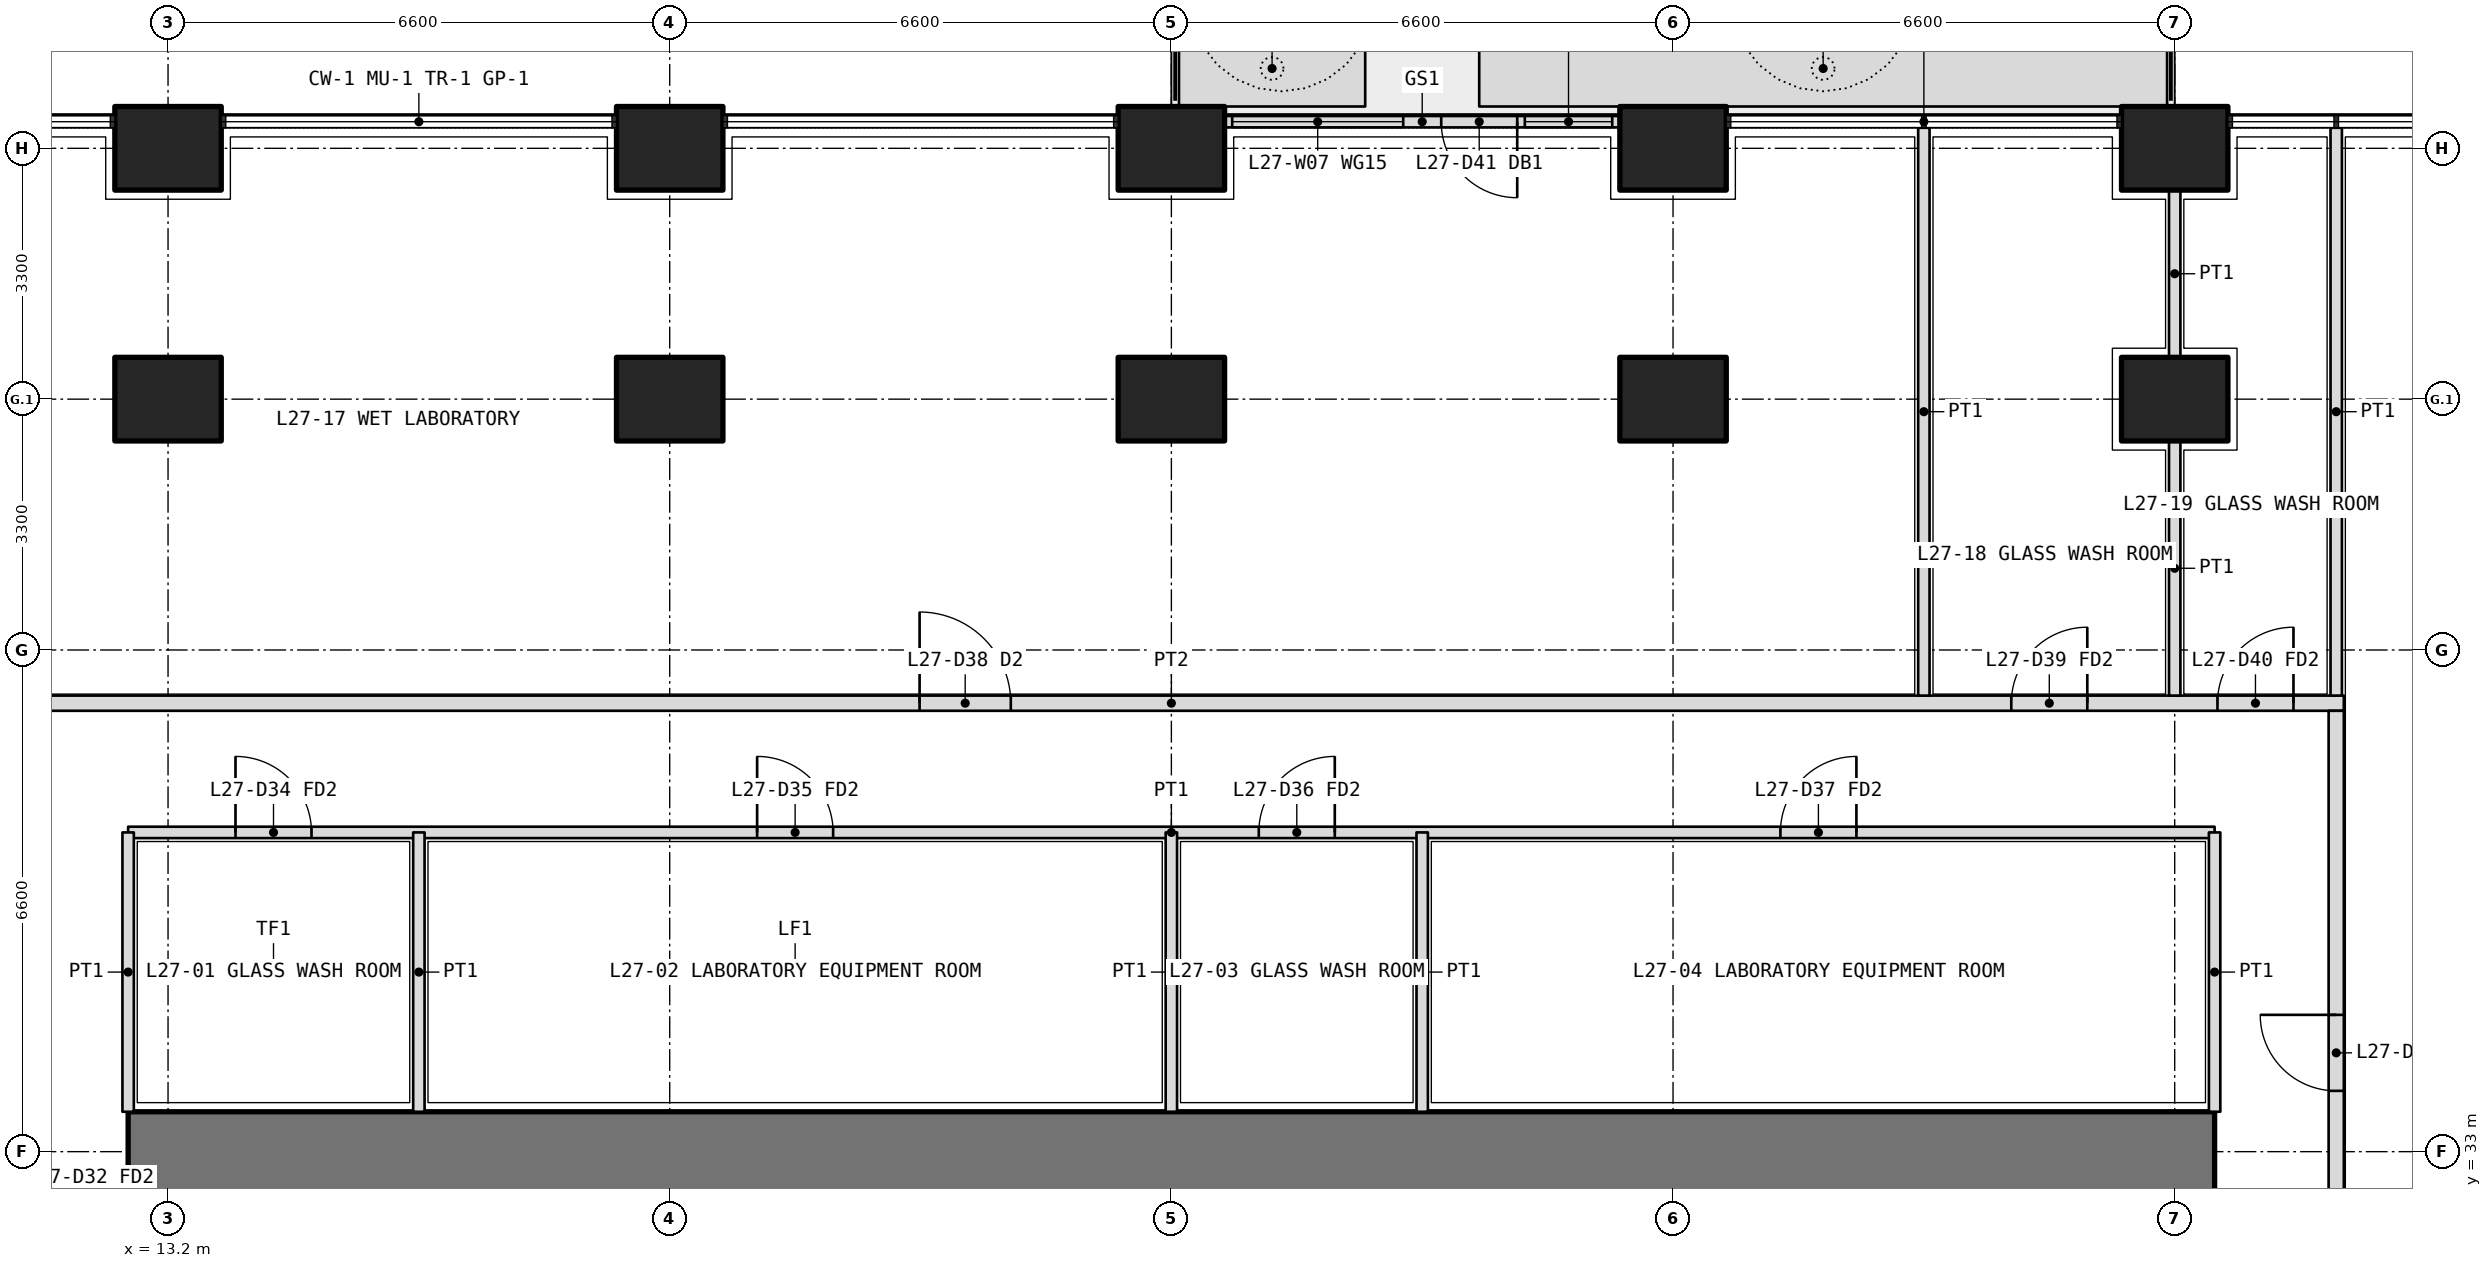
"""IFC4 building model, lengths in metres.
Left out: names, types, materials, properties, quantities, classifications, styles, units other than length and angle.
Written with IfcOpenShell. Run it as: python <this file> out.ifc"""

import sys

from ifc_helpers import new_model, si_unit, direction, frame, frame_2d, origin, origin_2d, place, context, subcontext, project, spatial, polyline, rectangle, outline, extrude, element, fill, save


model = new_model("IFC4")
c1 = context("Model", 3, precision=1e-05, world=origin(), true_north=direction((0.0, 1.0)))
c2 = subcontext(c1, "Body", "Model", "MODEL_VIEW")
j1 = project(units=[si_unit("LENGTHUNIT", "METRE"), si_unit("PLANEANGLEUNIT", "RADIAN")], contexts=[c1])
p1 = place(None, origin())
s1 = spatial("IfcSite", under=j1, at=p1, CompositionType="ELEMENT")
p2 = place(p1, origin())
s2 = spatial("IfcBuilding", under=s1, at=p2, CompositionType="ELEMENT")
p3 = place(p2, frame((0.0, 0.0, 120.0)))
s3 = spatial("IfcBuildingStorey", under=s2, at=p3, CompositionType="ELEMENT", Elevation=120.0)
for number, where, z_axis, x_axis in (
    (1, (13.2, 46.2, 0.0), (0.0, 0.0, 1.0), (1.0, 0.0, 0.0)),
    (2, (19.8, 46.2, 0.0), (0.0, 0.0, 1.0), (1.0, 0.0, 0.0)),
    (3, (26.4, 46.2, 0.0), (0.0, 0.0, 1.0), (1.0, 0.0, 0.0)),
    (4, (33.0, 46.2, 0.0), (0.0, 0.0, 1.0), (1.0, 0.0, 0.0)),
    (5, (39.6, 46.2, 0.0), (0.0, 0.0, 1.0), (1.0, 0.0, 0.0)),
    (6, (13.2, 42.9, 0.0), (0.0, 0.0, 1.0), (1.0, 0.0, 0.0)),
    (7, (19.8, 42.9, 0.0), (0.0, 0.0, 1.0), (1.0, 0.0, 0.0)),
    (8, (26.4, 42.9, 0.0), (0.0, 0.0, 1.0), (1.0, 0.0, 0.0)),
    (9, (33.0, 42.9, 0.0), (0.0, 0.0, 1.0), (1.0, 0.0, 0.0)),
    (10, (39.6, 42.9, 0.0), (0.0, 0.0, 1.0), (1.0, 0.0, 0.0)),
):
    element("IfcColumn", number, at=place(p3, frame(where, z_axis=z_axis, x_axis=x_axis)), inside=s3, PredefinedType="COLUMN", context=c2, shape_type="SweptSolid", body=[
        extrude(rectangle(XDim=1.4, YDim=1.1, at=origin_2d()), origin(), (0.0, 0.0, 1.0), 4.2),
    ])
p4 = place(p3, origin())
e11 = element("IfcWall", 11, at=p4, inside=s3, PredefinedType="USERDEFINED", context=c2, shape_type="SweptSolid", body=[
    extrude(outline(polyline([(26.5, 46.75), (28.95, 46.75), (28.95, 47.75), (26.5, 47.75), (26.5, 46.75)]), holes=[polyline([(26.65, 46.9), (28.8, 46.9), (28.8, 47.6), (26.65, 47.6), (26.65, 46.9)])]), origin(), (0.0, 0.0, 1.0), 1.05),
])
p5 = place(p3, origin())
e12 = element("IfcWall", 12, at=p5, inside=s3, PredefinedType="USERDEFINED", context=c2, shape_type="SweptSolid", body=[
    extrude(outline(polyline([(30.45, 46.75), (39.5, 46.75), (39.5, 47.75), (30.45, 47.75), (30.45, 46.75)]), holes=[polyline([(30.6, 46.9), (39.35, 46.9), (39.35, 47.6), (30.6, 47.6), (30.6, 46.9)])]), origin(), (0.0, 0.0, 1.0), 1.05),
])
p6 = place(p3, frame((32.3, 46.55, 0.0), z_axis=(0.0, 0.0, 1.0), x_axis=(-1.0, 0.0, 0.0)))
e13 = element("IfcWall", 13, at=p6, inside=s3, PredefinedType="SOLIDWALL", context=c2, shape_type="SweptSolid", body=[
    extrude(rectangle(XDim=5.2, YDim=0.15, at=frame_2d((2.6, 0.0))), origin(), (0.0, 0.0, 1.0), 2.7),
])
p7 = place(p6, frame((1.35, 0.0, 0.0)))
e14 = element("IfcOpeningElement", 14, at=p7, cuts=e13, PredefinedType="OPENING", context=c2, shape_type="SweptSolid", body=[
    extrude(rectangle(XDim=1.0, YDim=2.4, at=frame_2d((0.5, 1.2))), frame((0.0, 0.085, 0.0), z_axis=(0.0, -1.0, 0.0), x_axis=(1.0, 0.0, 0.0)), (0.0, 0.0, 1.0), 0.17),
])
p8 = place(p6, frame((0.1, 0.0, 0.1)))
e15 = element("IfcOpeningElement", 15, at=p8, cuts=e13, PredefinedType="OPENING", context=c2, shape_type="SweptSolid", body=[
    extrude(rectangle(XDim=1.15, YDim=2.3, at=frame_2d((0.575, 1.15))), frame((0.0, 0.085, 0.0), z_axis=(0.0, -1.0, 0.0), x_axis=(1.0, 0.0, 0.0)), (0.0, 0.0, 1.0), 0.17),
])
p9 = place(p6, frame((2.85, 0.0, 0.1)))
e16 = element("IfcOpeningElement", 16, at=p9, cuts=e13, PredefinedType="OPENING", context=c2, shape_type="SweptSolid", body=[
    extrude(rectangle(XDim=2.25, YDim=2.3, at=frame_2d((1.125, 1.15))), frame((0.0, 0.085, 0.0), z_axis=(0.0, -1.0, 0.0), x_axis=(1.0, 0.0, 0.0)), (0.0, 0.0, 1.0), 0.17),
])
p10 = place(p3, frame((40.125, 33.0, 0.0), z_axis=(0.0, 0.0, 1.0), x_axis=(-1.0, 0.0, 0.0)))
e17 = element("IfcWall", 17, at=p10, inside=s3, PredefinedType="SHEAR", context=c2, shape_type="SweptSolid", body=[
    extrude(rectangle(XDim=27.45, YDim=1.05, at=frame_2d((13.725, 0.0))), origin(), (0.0, 0.0, 1.0), 4.2),
])
p11 = place(p3, frame((12.675, 37.2, 0.0), z_axis=(0.0, 0.0, 1.0), x_axis=(1.0, 0.0, 0.0)))
e18 = element("IfcWall", 18, at=p11, inside=s3, PredefinedType="PARTITIONING", context=c2, shape_type="SweptSolid", body=[
    extrude(rectangle(XDim=27.45, YDim=0.15, at=frame_2d((13.725, 0.0))), origin(), (0.0, 0.0, 1.0), 2.85),
])
p12 = place(p11, frame((1.413, 0.0, 0.0)))
e19 = element("IfcOpeningElement", 19, at=p12, cuts=e18, PredefinedType="OPENING", context=c2, shape_type="SweptSolid", body=[
    extrude(rectangle(XDim=1.0, YDim=2.1, at=frame_2d((0.5, 1.05))), frame((0.0, 0.085, 0.0), z_axis=(0.0, -1.0, 0.0), x_axis=(1.0, 0.0, 0.0)), (0.0, 0.0, 1.0), 0.17),
])
p13 = place(p11, frame((8.275, 0.0, 0.0)))
e20 = element("IfcOpeningElement", 20, at=p13, cuts=e18, PredefinedType="OPENING", context=c2, shape_type="SweptSolid", body=[
    extrude(rectangle(XDim=1.0, YDim=2.1, at=frame_2d((0.5, 1.05))), frame((0.0, 0.085, 0.0), z_axis=(0.0, -1.0, 0.0), x_axis=(1.0, 0.0, 0.0)), (0.0, 0.0, 1.0), 0.17),
])
p14 = place(p11, frame((14.875, 0.0, 0.0)))
e21 = element("IfcOpeningElement", 21, at=p14, cuts=e18, PredefinedType="OPENING", context=c2, shape_type="SweptSolid", body=[
    extrude(rectangle(XDim=1.0, YDim=2.1, at=frame_2d((0.5, 1.05))), frame((0.0, 0.085, 0.0), z_axis=(0.0, -1.0, 0.0), x_axis=(1.0, 0.0, 0.0)), (0.0, 0.0, 1.0), 0.17),
])
p15 = place(p11, frame((21.738, 0.0, 0.0)))
e22 = element("IfcOpeningElement", 22, at=p15, cuts=e18, PredefinedType="OPENING", context=c2, shape_type="SweptSolid", body=[
    extrude(rectangle(XDim=1.0, YDim=2.1, at=frame_2d((0.5, 1.05))), frame((0.0, 0.085, 0.0), z_axis=(0.0, -1.0, 0.0), x_axis=(1.0, 0.0, 0.0)), (0.0, 0.0, 1.0), 0.17),
])
for number, where, z_axis, x_axis in (
    (23, (12.675, 33.525, 0.0), (0.0, 0.0, 1.0), (0.0, 1.0, 0.0)),
    (24, (40.125, 33.525, 0.0), (0.0, 0.0, 1.0), (0.0, 1.0, 0.0)),
):
    element("IfcWall", number, at=place(p3, frame(where, z_axis=z_axis, x_axis=x_axis)), inside=s3, PredefinedType="PARTITIONING", context=c2, shape_type="SweptSolid", body=[
        extrude(rectangle(XDim=3.675, YDim=0.15, at=frame_2d((1.837, 0.0))), origin(), (0.0, 0.0, 1.0), 2.85),
    ])
p16 = place(p3, frame((16.5, 33.525, 0.0), z_axis=(0.0, 0.0, 1.0), x_axis=(0.0, 1.0, 0.0)))
e25 = element("IfcWall", 25, at=p16, inside=s3, PredefinedType="PARTITIONING", context=c2, shape_type="SweptSolid", body=[
    extrude(rectangle(XDim=3.675, YDim=0.15, at=frame_2d((1.837, 0.0))), origin(), (0.0, 0.0, 1.0), 3.9),
])
p17 = place(p3, frame((26.4, 33.525, 0.0), z_axis=(0.0, 0.0, 1.0), x_axis=(0.0, 1.0, 0.0)))
e26 = element("IfcWall", 26, at=p17, inside=s3, PredefinedType="PARTITIONING", context=c2, shape_type="SweptSolid", body=[
    extrude(rectangle(XDim=3.675, YDim=0.15, at=frame_2d((1.837, 0.0))), origin(), (0.0, 0.0, 1.0), 2.85),
])
p18 = place(p3, frame((29.7, 33.525, 0.0), z_axis=(0.0, 0.0, 1.0), x_axis=(0.0, 1.0, 0.0)))
e27 = element("IfcWall", 27, at=p18, inside=s3, PredefinedType="PARTITIONING", context=c2, shape_type="SweptSolid", body=[
    extrude(rectangle(XDim=3.675, YDim=0.15, at=frame_2d((1.837, 0.0))), origin(), (0.0, 0.0, 1.0), 3.9),
])
p19 = place(p3, frame((10.975, 38.9, 0.0), z_axis=(0.0, 0.0, 1.0), x_axis=(1.0, 0.0, 0.0)))
e28 = element("IfcWall", 28, at=p19, inside=s3, PredefinedType="PARTITIONING", context=c2, shape_type="SweptSolid", body=[
    extrude(rectangle(XDim=30.85, YDim=0.2, at=frame_2d((15.425, 0.0))), origin(), (0.0, 0.0, 1.0), 2.85),
])
p20 = place(p19, frame((12.113, 0.0, 0.0)))
e29 = element("IfcOpeningElement", 29, at=p20, cuts=e28, PredefinedType="OPENING", context=c2, shape_type="SweptSolid", body=[
    extrude(rectangle(XDim=1.2, YDim=2.1, at=frame_2d((0.6, 1.05))), frame((0.0, 0.11, 0.0), z_axis=(0.0, -1.0, 0.0), x_axis=(1.0, 0.0, 0.0)), (0.0, 0.0, 1.0), 0.22),
])
p21 = place(p19, frame((26.475, 0.0, 0.0)))
e30 = element("IfcOpeningElement", 30, at=p21, cuts=e28, PredefinedType="OPENING", context=c2, shape_type="SweptSolid", body=[
    extrude(rectangle(XDim=1.0, YDim=2.1, at=frame_2d((0.5, 1.05))), frame((0.0, 0.11, 0.0), z_axis=(0.0, -1.0, 0.0), x_axis=(1.0, 0.0, 0.0)), (0.0, 0.0, 1.0), 0.22),
])
p22 = place(p19, frame((29.188, 0.0, 0.0)))
e31 = element("IfcOpeningElement", 31, at=p22, cuts=e28, PredefinedType="OPENING", context=c2, shape_type="SweptSolid", body=[
    extrude(rectangle(XDim=1.0, YDim=2.1, at=frame_2d((0.5, 1.05))), frame((0.0, 0.11, 0.0), z_axis=(0.0, -1.0, 0.0), x_axis=(1.0, 0.0, 0.0)), (0.0, 0.0, 1.0), 0.22),
])
p23 = place(p3, frame((41.725, 19.8, 0.0), z_axis=(0.0, 0.0, 1.0), x_axis=(0.0, 1.0, 0.0)))
e32 = element("IfcWall", 32, at=p23, inside=s3, PredefinedType="PARTITIONING", context=c2, shape_type="SweptSolid", body=[
    extrude(rectangle(XDim=19.0, YDim=0.2, at=frame_2d((9.5, 0.0))), origin(), (0.0, 0.0, 1.0), 2.85),
])
p24 = place(p23, frame((1.1, 0.0, 0.0)))
e33 = element("IfcOpeningElement", 33, at=p24, cuts=e32, PredefinedType="OPENING", context=c2, shape_type="SweptSolid", body=[
    extrude(rectangle(XDim=1.0, YDim=2.1, at=frame_2d((0.5, 1.05))), frame((0.0, 0.11, 0.0), z_axis=(0.0, -1.0, 0.0), x_axis=(1.0, 0.0, 0.0)), (0.0, 0.0, 1.0), 0.22),
])
p25 = place(p23, frame((4.45, 0.0, 0.0)))
e34 = element("IfcOpeningElement", 34, at=p25, cuts=e32, PredefinedType="OPENING", context=c2, shape_type="SweptSolid", body=[
    extrude(rectangle(XDim=0.9, YDim=2.1, at=frame_2d((0.45, 1.05))), frame((0.0, 0.11, 0.0), z_axis=(0.0, -1.0, 0.0), x_axis=(1.0, 0.0, 0.0)), (0.0, 0.0, 1.0), 0.22),
])
p26 = place(p23, frame((7.75, 0.0, 0.0)))
e35 = element("IfcOpeningElement", 35, at=p26, cuts=e32, PredefinedType="OPENING", context=c2, shape_type="SweptSolid", body=[
    extrude(rectangle(XDim=1.0, YDim=2.1, at=frame_2d((0.5, 1.05))), frame((0.0, 0.11, 0.0), z_axis=(0.0, -1.0, 0.0), x_axis=(1.0, 0.0, 0.0)), (0.0, 0.0, 1.0), 0.22),
])
p27 = place(p23, frame((14.0, 0.0, 0.0)))
e36 = element("IfcOpeningElement", 36, at=p27, cuts=e32, PredefinedType="OPENING", context=c2, shape_type="SweptSolid", body=[
    extrude(rectangle(XDim=1.0, YDim=2.1, at=frame_2d((0.5, 1.05))), frame((0.0, 0.11, 0.0), z_axis=(0.0, -1.0, 0.0), x_axis=(1.0, 0.0, 0.0)), (0.0, 0.0, 1.0), 0.22),
])
for number, where, z_axis, x_axis in (
    (37, (41.725, 46.47, 0.0), (0.0, 0.0, 1.0), (0.0, -1.0, 0.0)),
    (38, (36.3, 46.47, 0.0), (0.0, 0.0, 1.0), (0.0, -1.0, 0.0)),
):
    element("IfcWall", number, at=place(p3, frame(where, z_axis=z_axis, x_axis=x_axis)), inside=s3, PredefinedType="PARTITIONING", context=c2, shape_type="SweptSolid", body=[
        extrude(rectangle(XDim=7.47, YDim=0.15, at=frame_2d((3.735, 0.0))), origin(), (0.0, 0.0, 1.0), 2.7),
    ])
p28 = place(p3, frame((39.6, 45.65, 0.0), z_axis=(0.0, 0.0, 1.0), x_axis=(0.0, -1.0, 0.0)))
e39 = element("IfcWall", 39, at=p28, inside=s3, PredefinedType="PARTITIONING", context=c2, shape_type="SweptSolid", body=[
    extrude(rectangle(XDim=2.2, YDim=0.15, at=frame_2d((1.1, 0.0))), origin(), (0.0, 0.0, 1.0), 2.85),
])
p29 = place(p3, frame((39.6, 42.35, 0.0), z_axis=(0.0, 0.0, 1.0), x_axis=(0.0, -1.0, 0.0)))
e40 = element("IfcWall", 40, at=p29, inside=s3, PredefinedType="PARTITIONING", context=c2, shape_type="SweptSolid", body=[
    extrude(rectangle(XDim=3.35, YDim=0.15, at=frame_2d((1.675, 0.0))), origin(), (0.0, 0.0, 1.0), 2.85),
])
p30 = place(p7, origin())
e41 = element("IfcDoor", 41, at=p30, inside=s3, OperationType="SINGLE_SWING_LEFT", PredefinedType="DOOR", context=c2, shape_type="SweptSolid", body=[
    extrude(rectangle(XDim=1.0, YDim=2.4, at=frame_2d((0.5, 1.2))), frame((0.0, 0.025, 0.0), z_axis=(0.0, -1.0, 0.0), x_axis=(1.0, 0.0, 0.0)), (0.0, 0.0, 1.0), 0.05),
])
fill(e14, e41)
p31 = place(p8, origin())
e42 = element("IfcWindow", 42, at=p31, inside=s3, PartitioningType="SINGLE_PANEL", PredefinedType="WINDOW", context=c2, shape_type="SweptSolid", body=[
    extrude(rectangle(XDim=1.15, YDim=2.3, at=frame_2d((0.575, 1.15))), frame((0.0, 0.03, 0.0), z_axis=(0.0, -1.0, 0.0), x_axis=(1.0, 0.0, 0.0)), (0.0, 0.0, 1.0), 0.06),
])
fill(e15, e42)
p32 = place(p9, origin())
e43 = element("IfcWindow", 43, at=p32, inside=s3, PartitioningType="SINGLE_PANEL", PredefinedType="WINDOW", context=c2, shape_type="SweptSolid", body=[
    extrude(rectangle(XDim=2.25, YDim=2.3, at=frame_2d((1.125, 1.15))), frame((0.0, 0.03, 0.0), z_axis=(0.0, -1.0, 0.0), x_axis=(1.0, 0.0, 0.0)), (0.0, 0.0, 1.0), 0.06),
])
fill(e16, e43)
p33 = place(p12, origin())
e44 = element("IfcDoor", 44, at=p33, inside=s3, OperationType="SINGLE_SWING_LEFT", PredefinedType="DOOR", context=c2, shape_type="SweptSolid", body=[
    extrude(rectangle(XDim=1.0, YDim=2.1, at=frame_2d((0.5, 1.05))), frame((0.0, 0.025, 0.0), z_axis=(0.0, -1.0, 0.0), x_axis=(1.0, 0.0, 0.0)), (0.0, 0.0, 1.0), 0.05),
])
fill(e19, e44)
p34 = place(p13, origin())
e45 = element("IfcDoor", 45, at=p34, inside=s3, OperationType="SINGLE_SWING_LEFT", PredefinedType="DOOR", context=c2, shape_type="SweptSolid", body=[
    extrude(rectangle(XDim=1.0, YDim=2.1, at=frame_2d((0.5, 1.05))), frame((0.0, 0.025, 0.0), z_axis=(0.0, -1.0, 0.0), x_axis=(1.0, 0.0, 0.0)), (0.0, 0.0, 1.0), 0.05),
])
fill(e20, e45)
p35 = place(p14, origin())
e46 = element("IfcDoor", 46, at=p35, inside=s3, OperationType="SINGLE_SWING_RIGHT", PredefinedType="DOOR", context=c2, shape_type="SweptSolid", body=[
    extrude(rectangle(XDim=1.0, YDim=2.1, at=frame_2d((0.5, 1.05))), frame((0.0, 0.025, 0.0), z_axis=(0.0, -1.0, 0.0), x_axis=(1.0, 0.0, 0.0)), (0.0, 0.0, 1.0), 0.05),
])
fill(e21, e46)
p36 = place(p15, origin())
e47 = element("IfcDoor", 47, at=p36, inside=s3, OperationType="SINGLE_SWING_RIGHT", PredefinedType="DOOR", context=c2, shape_type="SweptSolid", body=[
    extrude(rectangle(XDim=1.0, YDim=2.1, at=frame_2d((0.5, 1.05))), frame((0.0, 0.025, 0.0), z_axis=(0.0, -1.0, 0.0), x_axis=(1.0, 0.0, 0.0)), (0.0, 0.0, 1.0), 0.05),
])
fill(e22, e47)
p37 = place(p27, origin())
e48 = element("IfcDoor", 48, at=p37, inside=s3, OperationType="SINGLE_SWING_RIGHT", PredefinedType="DOOR", context=c2, shape_type="SweptSolid", body=[
    extrude(rectangle(XDim=1.0, YDim=2.1, at=frame_2d((0.5, 1.05))), frame((0.0, 0.025, 0.0), z_axis=(0.0, -1.0, 0.0), x_axis=(1.0, 0.0, 0.0)), (0.0, 0.0, 1.0), 0.05),
])
fill(e36, e48)
p38 = place(p20, origin())
e49 = element("IfcDoor", 49, at=p38, inside=s3, OperationType="DOUBLE_DOOR_SINGLE_SWING", PredefinedType="DOOR", context=c2, shape_type="SweptSolid", body=[
    extrude(rectangle(XDim=1.2, YDim=2.1, at=frame_2d((0.6, 1.05))), frame((0.0, 0.025, 0.0), z_axis=(0.0, -1.0, 0.0), x_axis=(1.0, 0.0, 0.0)), (0.0, 0.0, 1.0), 0.05),
])
fill(e29, e49)
p39 = place(p21, origin())
e50 = element("IfcDoor", 50, at=p39, inside=s3, OperationType="SINGLE_SWING_RIGHT", PredefinedType="DOOR", context=c2, shape_type="SweptSolid", body=[
    extrude(rectangle(XDim=1.0, YDim=2.1, at=frame_2d((0.5, 1.05))), frame((0.0, 0.025, 0.0), z_axis=(0.0, -1.0, 0.0), x_axis=(1.0, 0.0, 0.0)), (0.0, 0.0, 1.0), 0.05),
])
fill(e30, e50)
p40 = place(p22, origin())
e51 = element("IfcDoor", 51, at=p40, inside=s3, OperationType="SINGLE_SWING_RIGHT", PredefinedType="DOOR", context=c2, shape_type="SweptSolid", body=[
    extrude(rectangle(XDim=1.0, YDim=2.1, at=frame_2d((0.5, 1.05))), frame((0.0, 0.025, 0.0), z_axis=(0.0, -1.0, 0.0), x_axis=(1.0, 0.0, 0.0)), (0.0, 0.0, 1.0), 0.05),
])
fill(e31, e51)
save(model, sys.argv[1])
